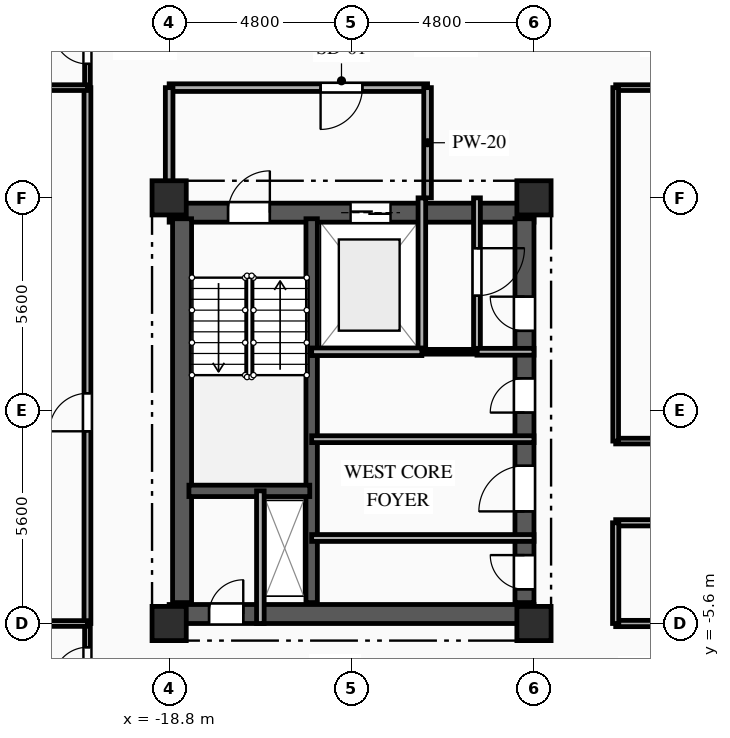
"""IFC4 building model, lengths in metres.
Left out: names, types, materials, properties, quantities, classifications, styles, units other than length and angle.
Written with IfcOpenShell. Run it as: python <this file> out.ifc"""

import sys

from ifc_helpers import new_model, si_unit, direction, frame, frame_2d, origin, origin_2d, place, context, subcontext, project, spatial, rectangle, extrude, element, fill, save


model = new_model("IFC4")
c1 = context("Model", 3, precision=1e-05, world=origin(), true_north=direction((0.0, 1.0)))
c2 = subcontext(c1, "Body", "Model", "MODEL_VIEW")
j1 = project(units=[si_unit("LENGTHUNIT", "METRE"), si_unit("PLANEANGLEUNIT", "RADIAN")], contexts=[c1])
p1 = place(None, origin())
s1 = spatial("IfcSite", under=j1, at=p1, CompositionType="ELEMENT")
p2 = place(p1, origin())
s2 = spatial("IfcBuilding", under=s1, at=p2, CompositionType="ELEMENT")
p3 = place(p2, frame((0.0, 0.0, 131.0)))
s3 = spatial("IfcBuildingStorey", under=s2, at=p3, CompositionType="ELEMENT", Elevation=131.0)
for number, where, z_axis, x_axis in (
    (1, (-18.8, -5.6, 0.0), (0.0, 0.0, 1.0), (1.0, 0.0, 0.0)),
    (2, (-18.8, 5.6, 0.0), (0.0, 0.0, 1.0), (1.0, 0.0, 0.0)),
    (3, (-9.2, -5.6, 0.0), (0.0, 0.0, 1.0), (1.0, 0.0, 0.0)),
    (4, (-9.2, 5.6, 0.0), (0.0, 0.0, 1.0), (1.0, 0.0, 0.0)),
):
    element("IfcColumn", number, at=place(p3, frame(where, z_axis=z_axis, x_axis=x_axis)), inside=s3, PredefinedType="COLUMN", context=c2, shape_type="SweptSolid", body=[
        extrude(rectangle(XDim=0.9, YDim=0.9, at=origin_2d()), origin(), (0.0, 0.0, 1.0), 3.35),
    ])
p4 = place(p3, frame((-18.8, 5.21, 0.0), z_axis=(0.0, 0.0, 1.0), x_axis=(1.0, 0.0, 0.0)))
e5 = element("IfcWall", 5, at=p4, inside=s3, PredefinedType="SHEAR", context=c2, shape_type="SweptSolid", body=[
    extrude(rectangle(XDim=9.6, YDim=0.5, at=frame_2d((4.8, 0.0))), origin(), (0.0, 0.0, 1.0), 3.04),
])
p5 = place(p4, frame((1.55, 0.0, 0.0)))
e6 = element("IfcOpeningElement", 6, at=p5, cuts=e5, PredefinedType="OPENING", context=c2, shape_type="SweptSolid", body=[
    extrude(rectangle(XDim=1.1, YDim=2.15, at=frame_2d((0.55, 1.075))), frame((0.0, 0.26, 0.0), z_axis=(0.0, -1.0, 0.0), x_axis=(1.0, 0.0, 0.0)), (0.0, 0.0, 1.0), 0.52),
])
p6 = place(p4, frame((4.775, 0.0, 0.0)))
e7 = element("IfcOpeningElement", 7, at=p6, cuts=e5, PredefinedType="OPENING", context=c2, shape_type="SweptSolid", body=[
    extrude(rectangle(XDim=1.05, YDim=2.1, at=frame_2d((0.525, 1.05))), frame((0.0, 0.26, 0.0), z_axis=(0.0, -1.0, 0.0), x_axis=(1.0, 0.0, 0.0)), (0.0, 0.0, 1.0), 0.52),
])
p7 = place(p3, frame((-18.8, -5.35, 0.0), z_axis=(0.0, 0.0, 1.0), x_axis=(1.0, 0.0, 0.0)))
e8 = element("IfcWall", 8, at=p7, inside=s3, PredefinedType="SHEAR", context=c2, shape_type="SweptSolid", body=[
    extrude(rectangle(XDim=9.6, YDim=0.5, at=frame_2d((4.8, 0.0))), origin(), (0.0, 0.0, 1.0), 3.04),
])
p8 = place(p7, frame((1.05, 0.0, 0.0)))
e9 = element("IfcOpeningElement", 9, at=p8, cuts=e8, PredefinedType="OPENING", context=c2, shape_type="SweptSolid", body=[
    extrude(rectangle(XDim=0.9, YDim=2.1, at=frame_2d((0.45, 1.05))), frame((0.0, 0.26, 0.0), z_axis=(0.0, -1.0, 0.0), x_axis=(1.0, 0.0, 0.0)), (0.0, 0.0, 1.0), 0.52),
])
p9 = place(p3, frame((-18.46, -5.05, 0.0), z_axis=(0.0, 0.0, 1.0), x_axis=(0.0, 1.0, 0.0)))
e10 = element("IfcWall", 10, at=p9, inside=s3, PredefinedType="SHEAR", context=c2, shape_type="SweptSolid", body=[
    extrude(rectangle(XDim=10.1, YDim=0.5, at=frame_2d((5.05, 0.0))), origin(), (0.0, 0.0, 1.0), 3.04),
])
p10 = place(p3, frame((-9.45, -5.05, 0.0), z_axis=(0.0, 0.0, 1.0), x_axis=(0.0, 1.0, 0.0)))
e11 = element("IfcWall", 11, at=p10, inside=s3, PredefinedType="SHEAR", context=c2, shape_type="SweptSolid", body=[
    extrude(rectangle(XDim=10.1, YDim=0.5, at=frame_2d((5.05, 0.0))), origin(), (0.0, 0.0, 1.0), 3.04),
])
p11 = place(p10, frame((7.15, 0.0, 0.0)))
e12 = element("IfcOpeningElement", 12, at=p11, cuts=e11, PredefinedType="OPENING", context=c2, shape_type="SweptSolid", body=[
    extrude(rectangle(XDim=0.9, YDim=2.1, at=frame_2d((0.45, 1.05))), frame((0.0, 0.26, 0.0), z_axis=(0.0, -1.0, 0.0), x_axis=(1.0, 0.0, 0.0)), (0.0, 0.0, 1.0), 0.52),
])
p12 = place(p10, frame((2.4, 0.0, 0.0)))
e13 = element("IfcOpeningElement", 13, at=p12, cuts=e11, PredefinedType="OPENING", context=c2, shape_type="SweptSolid", body=[
    extrude(rectangle(XDim=1.2, YDim=2.15, at=frame_2d((0.6, 1.075))), frame((0.0, 0.26, 0.0), z_axis=(0.0, -1.0, 0.0), x_axis=(1.0, 0.0, 0.0)), (0.0, 0.0, 1.0), 0.52),
])
p13 = place(p10, frame((0.35, 0.0, 0.0)))
e14 = element("IfcOpeningElement", 14, at=p13, cuts=e11, PredefinedType="OPENING", context=c2, shape_type="SweptSolid", body=[
    extrude(rectangle(XDim=0.9, YDim=2.1, at=frame_2d((0.45, 1.05))), frame((0.0, 0.26, 0.0), z_axis=(0.0, -1.0, 0.0), x_axis=(1.0, 0.0, 0.0)), (0.0, 0.0, 1.0), 0.52),
])
p14 = place(p10, frame((5.0, 0.0, 0.0)))
e15 = element("IfcOpeningElement", 15, at=p14, cuts=e11, PredefinedType="OPENING", context=c2, shape_type="SweptSolid", body=[
    extrude(rectangle(XDim=0.9, YDim=2.1, at=frame_2d((0.45, 1.05))), frame((0.0, 0.26, 0.0), z_axis=(0.0, -1.0, 0.0), x_axis=(1.0, 0.0, 0.0)), (0.0, 0.0, 1.0), 0.52),
])
p15 = place(p3, frame((-15.05, -5.05, 0.0), z_axis=(0.0, 0.0, 1.0), x_axis=(0.0, 1.0, 0.0)))
e16 = element("IfcWall", 16, at=p15, inside=s3, PredefinedType="SHEAR", context=c2, shape_type="SweptSolid", body=[
    extrude(rectangle(XDim=10.1, YDim=0.3, at=frame_2d((5.05, 0.0))), origin(), (0.0, 0.0, 1.0), 3.04),
])
p16 = place(p3, frame((-18.28, -2.11, 0.0), z_axis=(0.0, 0.0, 1.0), x_axis=(1.0, 0.0, 0.0)))
e17 = element("IfcWall", 17, at=p16, inside=s3, PredefinedType="SHEAR", context=c2, shape_type="SweptSolid", body=[
    extrude(rectangle(XDim=3.18, YDim=0.3, at=frame_2d((1.59, 0.0))), origin(), (0.0, 0.0, 1.0), 3.04),
])
p17 = place(p3, frame((-16.4, -5.6, 0.0), z_axis=(0.0, 0.0, 1.0), x_axis=(0.0, 1.0, 0.0)))
e18 = element("IfcWall", 18, at=p17, inside=s3, PredefinedType="PARTITIONING", context=c2, shape_type="SweptSolid", body=[
    extrude(rectangle(XDim=3.49, YDim=0.2, at=frame_2d((1.745, 0.0))), origin(), (0.0, 0.0, 1.0), 3.04),
])
p18 = place(p3, frame((-12.15, 1.55, 0.0), z_axis=(0.0, 0.0, 1.0), x_axis=(0.0, 1.0, 0.0)))
e19 = element("IfcWall", 19, at=p18, inside=s3, PredefinedType="PARTITIONING", context=c2, shape_type="SweptSolid", body=[
    extrude(rectangle(XDim=4.05, YDim=0.2, at=frame_2d((2.025, 0.0))), origin(), (0.0, 0.0, 1.0), 3.04),
])
p19 = place(p3, frame((-12.0, 8.5, 0.0), z_axis=(0.0, 0.0, 1.0), x_axis=(-1.0, 0.0, 0.0)))
e20 = element("IfcWall", 20, at=p19, inside=s3, PredefinedType="PARTITIONING", context=c2, shape_type="SweptSolid", body=[
    extrude(rectangle(XDim=6.8, YDim=0.2, at=frame_2d((3.4, 0.0))), origin(), (0.0, 0.0, 1.0), 3.04),
])
p20 = place(p19, frame((1.715, 0.0, 0.0)))
e21 = element("IfcOpeningElement", 21, at=p20, cuts=e20, PredefinedType="OPENING", context=c2, shape_type="SweptSolid", body=[
    extrude(rectangle(XDim=1.1, YDim=2.15, at=frame_2d((0.55, 1.075))), frame((0.0, 0.11, 0.0), z_axis=(0.0, -1.0, 0.0), x_axis=(1.0, 0.0, 0.0)), (0.0, 0.0, 1.0), 0.22),
])
p21 = place(p3, frame((-18.8, 8.5, 0.0), z_axis=(0.0, 0.0, 1.0), x_axis=(0.0, -1.0, 0.0)))
e22 = element("IfcWall", 22, at=p21, inside=s3, PredefinedType="PARTITIONING", context=c2, shape_type="SweptSolid", body=[
    extrude(rectangle(XDim=2.9, YDim=0.2, at=frame_2d((1.45, 0.0))), origin(), (0.0, 0.0, 1.0), 2.525),
])
p22 = place(p3, frame((-12.0, 5.6, 0.0), z_axis=(0.0, 0.0, 1.0), x_axis=(0.0, 1.0, 0.0)))
e23 = element("IfcWall", 23, at=p22, inside=s3, PredefinedType="PARTITIONING", context=c2, shape_type="SweptSolid", body=[
    extrude(rectangle(XDim=2.9, YDim=0.2, at=frame_2d((1.45, 0.0))), origin(), (0.0, 0.0, 1.0), 3.04),
])
p23 = place(p3, frame((-10.7, 5.6, 0.0), z_axis=(0.0, 0.0, 1.0), x_axis=(0.0, -1.0, 0.0)))
e24 = element("IfcWall", 24, at=p23, inside=s3, PredefinedType="PARTITIONING", context=c2, shape_type="SweptSolid", body=[
    extrude(rectangle(XDim=4.05, YDim=0.18, at=frame_2d((2.025, 0.0))), origin(), (0.0, 0.0, 1.0), 3.04),
])
p24 = place(p23, frame((1.325, 0.0, 0.0)))
e25 = element("IfcOpeningElement", 25, at=p24, cuts=e24, PredefinedType="OPENING", context=c2, shape_type="SweptSolid", body=[
    extrude(rectangle(XDim=1.25, YDim=2.2, at=frame_2d((0.625, 1.1))), frame((0.0, 0.1, 0.0), z_axis=(0.0, -1.0, 0.0), x_axis=(1.0, 0.0, 0.0)), (0.0, 0.0, 1.0), 0.2),
])
p25 = place(p3, frame((-10.7, 1.55, 0.0), z_axis=(0.0, 0.0, 1.0), x_axis=(1.0, 0.0, 0.0)))
e26 = element("IfcWall", 26, at=p25, inside=s3, PredefinedType="PARTITIONING", context=c2, shape_type="SweptSolid", body=[
    extrude(rectangle(XDim=1.5, YDim=0.18, at=frame_2d((0.75, 0.0))), origin(), (0.0, 0.0, 1.0), 3.04),
])
p26 = place(p3, frame((-12.15, 1.55, 0.0), z_axis=(0.0, 0.0, 1.0), x_axis=(1.0, 0.0, 0.0)))
e27 = element("IfcWall", 27, at=p26, inside=s3, PredefinedType="PARTITIONING", context=c2, shape_type="SweptSolid", body=[
    extrude(rectangle(XDim=1.45, YDim=0.125, at=frame_2d((0.725, 0.0))), origin(), (0.0, 0.0, 1.0), 3.04),
])
p27 = place(p3, frame((-15.05, -3.35, 0.0), z_axis=(0.0, 0.0, 1.0), x_axis=(1.0, 0.0, 0.0)))
e28 = element("IfcWall", 28, at=p27, inside=s3, PredefinedType="PARTITIONING", context=c2, shape_type="SweptSolid", body=[
    extrude(rectangle(XDim=5.85, YDim=0.18, at=frame_2d((2.925, 0.0))), origin(), (0.0, 0.0, 1.0), 2.755),
])
p28 = place(p3, frame((-9.2, -0.75, 0.0), z_axis=(0.0, 0.0, 1.0), x_axis=(-1.0, 0.0, 0.0)))
e29 = element("IfcWall", 29, at=p28, inside=s3, PredefinedType="PARTITIONING", context=c2, shape_type="SweptSolid", body=[
    extrude(rectangle(XDim=5.85, YDim=0.18, at=frame_2d((2.925, 0.0))), origin(), (0.0, 0.0, 1.0), 3.04),
])
p29 = place(p3, frame((-20.95, 8.5, 0.0), z_axis=(0.0, 0.0, 1.0), x_axis=(0.0, 1.0, 0.0)))
e30 = element("IfcWall", 30, at=p29, inside=s3, PredefinedType="PARTITIONING", context=c2, shape_type="SweptSolid", body=[
    extrude(rectangle(XDim=2.15, YDim=0.15, at=frame_2d((1.075, 0.0))), origin(), (0.0, 0.0, 1.0), 3.04),
])
p30 = place(p29, frame((0.625, 0.0, 0.0)))
e31 = element("IfcOpeningElement", 31, at=p30, cuts=e30, PredefinedType="OPENING", context=c2, shape_type="SweptSolid", body=[
    extrude(rectangle(XDim=0.9, YDim=2.1, at=frame_2d((0.45, 1.05))), frame((0.0, 0.085, 0.0), z_axis=(0.0, -1.0, 0.0), x_axis=(1.0, 0.0, 0.0)), (0.0, 0.0, 1.0), 0.17),
])
p31 = place(p3, frame((0.0, 8.5, 0.0), z_axis=(0.0, 0.0, 1.0), x_axis=(-1.0, 0.0, 0.0)))
e32 = element("IfcWall", 32, at=p31, inside=s3, PredefinedType="PARTITIONING", context=c2, shape_type="SweptSolid", body=[
    extrude(rectangle(XDim=7.05, YDim=0.15, at=frame_2d((3.525, 0.0))), origin(), (0.0, 0.0, 1.0), 3.04),
])
p32 = place(p3, frame((-20.95, -7.75, 0.0), z_axis=(0.0, 0.0, 1.0), x_axis=(0.0, 1.0, 0.0)))
e33 = element("IfcWall", 33, at=p32, inside=s3, PredefinedType="PARTITIONING", context=c2, shape_type="SweptSolid", body=[
    extrude(rectangle(XDim=2.15, YDim=0.15, at=frame_2d((1.075, 0.0))), origin(), (0.0, 0.0, 1.0), 3.04),
])
p33 = place(p32, frame((0.625, 0.0, 0.0)))
e34 = element("IfcOpeningElement", 34, at=p33, cuts=e33, PredefinedType="OPENING", context=c2, shape_type="SweptSolid", body=[
    extrude(rectangle(XDim=0.9, YDim=2.1, at=frame_2d((0.45, 1.05))), frame((0.0, 0.085, 0.0), z_axis=(0.0, -1.0, 0.0), x_axis=(1.0, 0.0, 0.0)), (0.0, 0.0, 1.0), 0.17),
])
p34 = place(p3, frame((-7.05, -5.6, 0.0), z_axis=(0.0, 0.0, 1.0), x_axis=(1.0, 0.0, 0.0)))
e35 = element("IfcWall", 35, at=p34, inside=s3, PredefinedType="PARTITIONING", context=c2, shape_type="SweptSolid", body=[
    extrude(rectangle(XDim=7.05, YDim=0.165, at=frame_2d((3.525, 0.0))), origin(), (0.0, 0.0, 1.0), 2.525),
])
p35 = place(p3, frame((-20.95, -5.6, 0.0), z_axis=(0.0, 0.0, 1.0), x_axis=(0.0, 1.0, 0.0)))
e36 = element("IfcWall", 36, at=p35, inside=s3, PredefinedType="PARTITIONING", context=c2, shape_type="SweptSolid", body=[
    extrude(rectangle(XDim=14.1, YDim=0.18, at=frame_2d((7.05, 0.0))), origin(), (0.0, 0.0, 1.0), 3.04),
])
p36 = place(p35, frame((5.058, 0.0, 0.0)))
e37 = element("IfcOpeningElement", 37, at=p36, cuts=e36, PredefinedType="OPENING", context=c2, shape_type="SweptSolid", body=[
    extrude(rectangle(XDim=1.0, YDim=2.15, at=frame_2d((0.5, 1.075))), frame((0.0, 0.1, 0.0), z_axis=(0.0, -1.0, 0.0), x_axis=(1.0, 0.0, 0.0)), (0.0, 0.0, 1.0), 0.2),
])
p37 = place(p3, frame((-7.05, -0.8, 0.0), z_axis=(0.0, 0.0, 1.0), x_axis=(1.0, 0.0, 0.0)))
e38 = element("IfcWall", 38, at=p37, inside=s3, PredefinedType="PARTITIONING", context=c2, shape_type="SweptSolid", body=[
    extrude(rectangle(XDim=14.1, YDim=0.15, at=frame_2d((7.05, 0.0))), origin(), (0.0, 0.0, 1.0), 3.04),
])
p38 = place(p37, frame((6.525, 0.0, 0.0)))
e39 = element("IfcOpeningElement", 39, at=p38, cuts=e38, PredefinedType="OPENING", context=c2, shape_type="SweptSolid", body=[
    extrude(rectangle(XDim=1.05, YDim=2.15, at=frame_2d((0.525, 1.075))), frame((0.0, 0.085, 0.0), z_axis=(0.0, -1.0, 0.0), x_axis=(1.0, 0.0, 0.0)), (0.0, 0.0, 1.0), 0.17),
])
p39 = place(p3, frame((7.05, -2.95, 0.0), z_axis=(0.0, 0.0, 1.0), x_axis=(-1.0, 0.0, 0.0)))
e40 = element("IfcWall", 40, at=p39, inside=s3, PredefinedType="PARTITIONING", context=c2, shape_type="SweptSolid", body=[
    extrude(rectangle(XDim=14.1, YDim=0.165, at=frame_2d((7.05, 0.0))), origin(), (0.0, 0.0, 1.0), 3.04),
])
p40 = place(p39, frame((6.475, 0.0, 0.0)))
e41 = element("IfcOpeningElement", 41, at=p40, cuts=e40, PredefinedType="OPENING", context=c2, shape_type="SweptSolid", body=[
    extrude(rectangle(XDim=1.15, YDim=2.15, at=frame_2d((0.575, 1.075))), frame((0.0, 0.093, 0.0), z_axis=(0.0, -1.0, 0.0), x_axis=(1.0, 0.0, 0.0)), (0.0, 0.0, 1.0), 0.185),
])
p41 = place(p3, frame((-7.05, 8.5, 0.0), z_axis=(0.0, 0.0, 1.0), x_axis=(0.0, -1.0, 0.0)))
e42 = element("IfcWall", 42, at=p41, inside=s3, PredefinedType="PARTITIONING", context=c2, shape_type="SweptSolid", body=[
    extrude(rectangle(XDim=9.3, YDim=0.15, at=frame_2d((4.65, 0.0))), origin(), (0.0, 0.0, 1.0), 3.04),
])
p42 = place(p3, frame((-7.05, -2.95, 0.0), z_axis=(0.0, 0.0, 1.0), x_axis=(0.0, -1.0, 0.0)))
e43 = element("IfcWall", 43, at=p42, inside=s3, PredefinedType="PARTITIONING", context=c2, shape_type="SweptSolid", body=[
    extrude(rectangle(XDim=2.65, YDim=0.165, at=frame_2d((1.325, 0.0))), origin(), (0.0, 0.0, 1.0), 3.04),
])
p43 = place(p3, frame((-23.6, 8.5, 0.0), z_axis=(0.0, 0.0, 1.0), x_axis=(1.0, 0.0, 0.0)))
e44 = element("IfcWall", 44, at=p43, inside=s3, PredefinedType="PARTITIONING", context=c2, shape_type="SweptSolid", body=[
    extrude(rectangle(XDim=2.65, YDim=0.15, at=frame_2d((1.325, 0.0))), origin(), (0.0, 0.0, 1.0), 3.04),
])
p44 = place(p43, frame((0.635, 0.0, 0.0)))
e45 = element("IfcOpeningElement", 45, at=p44, cuts=e44, PredefinedType="OPENING", context=c2, shape_type="SweptSolid", body=[
    extrude(rectangle(XDim=1.05, YDim=2.15, at=frame_2d((0.525, 1.075))), frame((0.0, 0.085, 0.0), z_axis=(0.0, -1.0, 0.0), x_axis=(1.0, 0.0, 0.0)), (0.0, 0.0, 1.0), 0.17),
])
p45 = place(p3, frame((-20.95, -5.6, 0.0), z_axis=(0.0, 0.0, 1.0), x_axis=(-1.0, 0.0, 0.0)))
e46 = element("IfcWall", 46, at=p45, inside=s3, PredefinedType="PARTITIONING", context=c2, shape_type="SweptSolid", body=[
    extrude(rectangle(XDim=2.65, YDim=0.15, at=frame_2d((1.325, 0.0))), origin(), (0.0, 0.0, 1.0), 3.04),
])
p46 = place(p45, frame((0.965, 0.0, 0.0)))
e47 = element("IfcOpeningElement", 47, at=p46, cuts=e46, PredefinedType="OPENING", context=c2, shape_type="SweptSolid", body=[
    extrude(rectangle(XDim=1.05, YDim=2.15, at=frame_2d((0.525, 1.075))), frame((0.0, 0.085, 0.0), z_axis=(0.0, -1.0, 0.0), x_axis=(1.0, 0.0, 0.0)), (0.0, 0.0, 1.0), 0.17),
])
p47 = place(p3, frame((-15.05, 1.55, 0.0), z_axis=(0.0, 0.0, 1.0), x_axis=(1.0, 0.0, 0.0)))
e48 = element("IfcWall", 48, at=p47, inside=s3, PredefinedType="PARTITIONING", context=c2, shape_type="SweptSolid", body=[
    extrude(rectangle(XDim=2.9, YDim=0.2, at=frame_2d((1.45, 0.0))), origin(), (0.0, 0.0, 1.0), 3.04),
])
p48 = place(p5, origin())
e49 = element("IfcDoor", 49, at=p48, inside=s3, OperationType="SINGLE_SWING_RIGHT", PredefinedType="DOOR", context=c2, shape_type="SweptSolid", body=[
    extrude(rectangle(XDim=1.1, YDim=2.15, at=frame_2d((0.55, 1.075))), frame((0.0, 0.025, 0.0), z_axis=(0.0, -1.0, 0.0), x_axis=(1.0, 0.0, 0.0)), (0.0, 0.0, 1.0), 0.05),
])
fill(e6, e49)
p49 = place(p6, origin())
e50 = element("IfcDoor", 50, at=p49, inside=s3, OperationType="DOUBLE_DOOR_SLIDING", PredefinedType="DOOR", context=c2, shape_type="SweptSolid", body=[
    extrude(rectangle(XDim=1.05, YDim=2.1, at=frame_2d((0.525, 1.05))), frame((0.0, 0.025, 0.0), z_axis=(0.0, -1.0, 0.0), x_axis=(1.0, 0.0, 0.0)), (0.0, 0.0, 1.0), 0.05),
])
fill(e7, e50)
p50 = place(p8, origin())
e51 = element("IfcDoor", 51, at=p50, inside=s3, OperationType="SINGLE_SWING_RIGHT", PredefinedType="DOOR", context=c2, shape_type="SweptSolid", body=[
    extrude(rectangle(XDim=0.9, YDim=2.1, at=frame_2d((0.45, 1.05))), frame((0.0, 0.025, 0.0), z_axis=(0.0, -1.0, 0.0), x_axis=(1.0, 0.0, 0.0)), (0.0, 0.0, 1.0), 0.05),
])
fill(e9, e51)
p51 = place(p20, origin())
e52 = element("IfcDoor", 52, at=p51, inside=s3, OperationType="SINGLE_SWING_RIGHT", PredefinedType="DOOR", context=c2, shape_type="SweptSolid", body=[
    extrude(rectangle(XDim=1.1, YDim=2.15, at=frame_2d((0.55, 1.075))), frame((0.0, 0.025, 0.0), z_axis=(0.0, -1.0, 0.0), x_axis=(1.0, 0.0, 0.0)), (0.0, 0.0, 1.0), 0.05),
])
fill(e21, e52)
p52 = place(p24, origin())
e53 = element("IfcDoor", 53, at=p52, inside=s3, OperationType="SINGLE_SWING_LEFT", PredefinedType="DOOR", context=c2, shape_type="SweptSolid", body=[
    extrude(rectangle(XDim=1.25, YDim=2.2, at=frame_2d((0.625, 1.1))), frame((0.0, 0.025, 0.0), z_axis=(0.0, -1.0, 0.0), x_axis=(1.0, 0.0, 0.0)), (0.0, 0.0, 1.0), 0.05),
])
fill(e25, e53)
p53 = place(p11, origin())
e54 = element("IfcDoor", 54, at=p53, inside=s3, OperationType="SINGLE_SWING_RIGHT", PredefinedType="DOOR", context=c2, shape_type="SweptSolid", body=[
    extrude(rectangle(XDim=0.9, YDim=2.1, at=frame_2d((0.45, 1.05))), frame((0.0, 0.025, 0.0), z_axis=(0.0, -1.0, 0.0), x_axis=(1.0, 0.0, 0.0)), (0.0, 0.0, 1.0), 0.05),
])
fill(e12, e54)
p54 = place(p12, origin())
e55 = element("IfcDoor", 55, at=p54, inside=s3, OperationType="SINGLE_SWING_LEFT", PredefinedType="DOOR", context=c2, shape_type="SweptSolid", body=[
    extrude(rectangle(XDim=1.2, YDim=2.15, at=frame_2d((0.6, 1.075))), frame((0.0, 0.025, 0.0), z_axis=(0.0, -1.0, 0.0), x_axis=(1.0, 0.0, 0.0)), (0.0, 0.0, 1.0), 0.05),
])
fill(e13, e55)
p55 = place(p13, origin())
e56 = element("IfcDoor", 56, at=p55, inside=s3, OperationType="SINGLE_SWING_RIGHT", PredefinedType="DOOR", context=c2, shape_type="SweptSolid", body=[
    extrude(rectangle(XDim=0.9, YDim=2.1, at=frame_2d((0.45, 1.05))), frame((0.0, 0.025, 0.0), z_axis=(0.0, -1.0, 0.0), x_axis=(1.0, 0.0, 0.0)), (0.0, 0.0, 1.0), 0.05),
])
fill(e14, e56)
p56 = place(p14, origin())
e57 = element("IfcDoor", 57, at=p56, inside=s3, OperationType="SINGLE_SWING_LEFT", PredefinedType="DOOR", context=c2, shape_type="SweptSolid", body=[
    extrude(rectangle(XDim=0.9, YDim=2.1, at=frame_2d((0.45, 1.05))), frame((0.0, 0.025, 0.0), z_axis=(0.0, -1.0, 0.0), x_axis=(1.0, 0.0, 0.0)), (0.0, 0.0, 1.0), 0.05),
])
fill(e15, e57)
p57 = place(p30, origin())
e58 = element("IfcDoor", 58, at=p57, inside=s3, OperationType="SINGLE_SWING_RIGHT", PredefinedType="DOOR", context=c2, shape_type="SweptSolid", body=[
    extrude(rectangle(XDim=0.9, YDim=2.1, at=frame_2d((0.45, 1.05))), frame((0.0, 0.025, 0.0), z_axis=(0.0, -1.0, 0.0), x_axis=(1.0, 0.0, 0.0)), (0.0, 0.0, 1.0), 0.05),
])
fill(e31, e58)
p58 = place(p33, origin())
e59 = element("IfcDoor", 59, at=p58, inside=s3, OperationType="SINGLE_SWING_LEFT", PredefinedType="DOOR", context=c2, shape_type="SweptSolid", body=[
    extrude(rectangle(XDim=0.9, YDim=2.1, at=frame_2d((0.45, 1.05))), frame((0.0, 0.025, 0.0), z_axis=(0.0, -1.0, 0.0), x_axis=(1.0, 0.0, 0.0)), (0.0, 0.0, 1.0), 0.05),
])
fill(e34, e59)
p59 = place(p36, origin())
e60 = element("IfcDoor", 60, at=p59, inside=s3, OperationType="SINGLE_SWING_LEFT", PredefinedType="DOOR", context=c2, shape_type="SweptSolid", body=[
    extrude(rectangle(XDim=1.0, YDim=2.15, at=frame_2d((0.5, 1.075))), frame((0.0, 0.025, 0.0), z_axis=(0.0, -1.0, 0.0), x_axis=(1.0, 0.0, 0.0)), (0.0, 0.0, 1.0), 0.05),
])
fill(e37, e60)
save(model, sys.argv[1])
